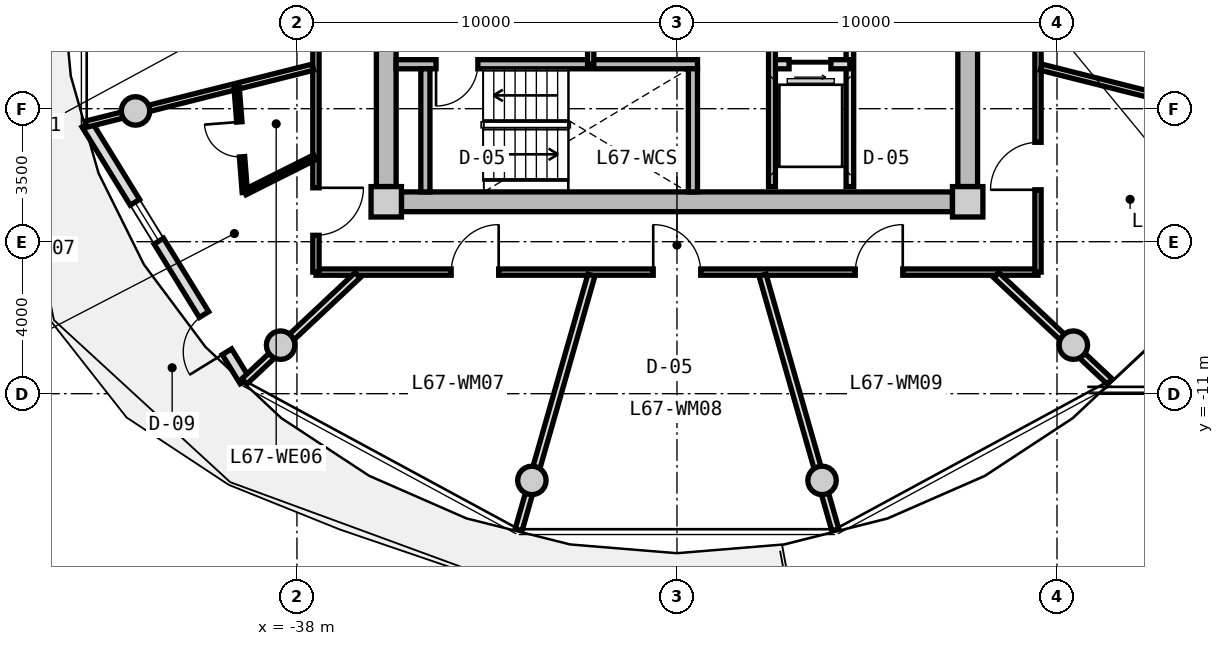
"""IFC4 building model, lengths in metres.
Left out: names, types, materials, properties, quantities, classifications, styles, units other than length and angle.
Written with IfcOpenShell. Run it as: python <this file> out.ifc"""

import sys

from ifc_helpers import new_model, si_unit, direction, frame, frame_2d, origin, origin_2d, place, context, subcontext, project, spatial, rectangle, circle, extrude, source, transform, mapped, element, fill, save


model = new_model("IFC4")
c1 = context("Model", 3, precision=1e-05, world=origin(), true_north=direction((0.0, 1.0)))
c2 = subcontext(c1, "Body", "Model", "MODEL_VIEW")
j1 = project(units=[si_unit("LENGTHUNIT", "METRE"), si_unit("PLANEANGLEUNIT", "RADIAN")], contexts=[c1])
p1 = place(None, origin())
s1 = spatial("IfcSite", under=j1, at=p1, CompositionType="ELEMENT")
p2 = place(p1, origin())
s2 = spatial("IfcBuilding", under=s1, at=p2, CompositionType="ELEMENT")
p3 = place(p2, frame((0.0, 0.0, 216.95)))
s3 = spatial("IfcBuildingStorey", under=s2, at=p3, CompositionType="ELEMENT", Elevation=216.95)
m1 = source(origin(), c2, "Body", "SweptSolid", [
    extrude(rectangle(XDim=0.8, YDim=0.8, at=origin_2d()), origin(), (0.0, 0.0, 1.0), 3.05),
])
for number, where, z_axis, x_axis in (
    (1, (-35.65, -5.95, 0.0), (0.0, 0.0, 1.0), (1.0, 0.0, 0.0)),
    (2, (-20.35, -5.95, 0.0), (0.0, 0.0, 1.0), (1.0, 0.0, 0.0)),
):
    element("IfcColumn", number, at=place(p3, frame(where, z_axis=z_axis, x_axis=x_axis)), inside=s3, PredefinedType="COLUMN", context=c2, shape_type="MappedRepresentation", body=[
        mapped(m1, transform((0.0, 0.0, 0.0), x_axis=(1.0, 0.0, 0.0), y_axis=(0.0, 1.0, 0.0), z_axis=(0.0, 0.0, 1.0), scale=1.0)),
    ])
m2 = source(origin(), c2, "Body", "SweptSolid", [
    extrude(rectangle(XDim=14.5, YDim=0.52, at=frame_2d((7.25, 0.0))), origin(), (0.0, 0.0, 1.0), 2.76),
])
p4 = place(p3, frame((-20.75, -5.95, 0.0), z_axis=(0.0, 0.0, 1.0), x_axis=(-1.0, 0.0, 0.0)))
e3 = element("IfcWall", 3, at=p4, inside=s3, PredefinedType="SHEAR", context=c2, shape_type="MappedRepresentation", body=[
    mapped(m2, transform((0.0, 0.0, 0.0), x_axis=(1.0, 0.0, 0.0), y_axis=(0.0, 1.0, 0.0), z_axis=(0.0, 0.0, 1.0), scale=1.0)),
])
m3 = source(origin(), c2, "Body", "SweptSolid", [
    extrude(rectangle(XDim=11.1, YDim=0.52, at=frame_2d((5.55, 0.0))), origin(), (0.0, 0.0, 1.0), 2.76),
])
p5 = place(p3, frame((-35.65, -5.55, 0.0), z_axis=(0.0, 0.0, 1.0), x_axis=(0.0, 1.0, 0.0)))
e4 = element("IfcWall", 4, at=p5, inside=s3, PredefinedType="SHEAR", context=c2, shape_type="MappedRepresentation", body=[
    mapped(m3, transform((0.0, 0.0, 0.0), x_axis=(1.0, 0.0, 0.0), y_axis=(0.0, 1.0, 0.0), z_axis=(0.0, 0.0, 1.0), scale=1.0)),
])
p6 = place(p5, frame((3.8, 0.0, 0.0)))
e5 = element("IfcOpeningElement", 5, at=p6, cuts=e4, PredefinedType="OPENING", context=c2, shape_type="SweptSolid", body=[
    extrude(rectangle(XDim=1.2, YDim=2.15, at=frame_2d((0.6, 1.075))), frame((0.0, 0.27, 0.0), z_axis=(0.0, -1.0, 0.0), x_axis=(1.0, 0.0, 0.0)), (0.0, 0.0, 1.0), 0.54),
])
p7 = place(p3, frame((-20.35, 5.55, 0.0), z_axis=(0.0, 0.0, 1.0), x_axis=(0.0, -1.0, 0.0)))
e6 = element("IfcWall", 6, at=p7, inside=s3, PredefinedType="SHEAR", context=c2, shape_type="MappedRepresentation", body=[
    mapped(m3, transform((0.0, 0.0, 0.0), x_axis=(1.0, 0.0, 0.0), y_axis=(0.0, 1.0, 0.0), z_axis=(0.0, 0.0, 1.0), scale=1.0)),
])
p8 = place(p7, frame((5.65, 0.0, 0.0)))
e7 = element("IfcOpeningElement", 7, at=p8, cuts=e6, PredefinedType="OPENING", context=c2, shape_type="SweptSolid", body=[
    extrude(rectangle(XDim=1.2, YDim=2.15, at=frame_2d((0.6, 1.075))), frame((0.0, 0.27, 0.0), z_axis=(0.0, -1.0, 0.0), x_axis=(1.0, 0.0, 0.0)), (0.0, 0.0, 1.0), 0.54),
])
m4 = source(origin(), c2, "Body", "SweptSolid", [
    extrude(circle(Radius=0.375, at=origin_2d()), origin(), (0.0, 0.0, 1.0), 3.05),
])
for number, where, z_axis, x_axis in (
    (8, (-42.247, -3.559, 0.0), (0.0, 0.0, 1.0), (1.0, 0.0, 0.0)),
    (9, (-38.43, -9.723, 0.0), (0.0, 0.0, 1.0), (1.0, 0.0, 0.0)),
    (10, (-31.818, -13.281, 0.0), (0.0, 0.0, 1.0), (1.0, 0.0, 0.0)),
    (11, (-24.182, -13.281, 0.0), (0.0, 0.0, 1.0), (1.0, 0.0, 0.0)),
    (12, (-17.57, -9.723, 0.0), (0.0, 0.0, 1.0), (1.0, 0.0, 0.0)),
):
    element("IfcColumn", number, at=place(p3, frame(where, z_axis=z_axis, x_axis=x_axis)), inside=s3, PredefinedType="COLUMN", context=c2, shape_type="MappedRepresentation", body=[
        mapped(m4, transform((0.0, 0.0, 0.0), x_axis=(1.0, 0.0, 0.0), y_axis=(0.0, 1.0, 0.0), z_axis=(0.0, 0.0, 1.0), scale=1.0)),
    ])
m5 = source(origin(), c2, "Body", "SweptSolid", [
    extrude(rectangle(XDim=7.938, YDim=0.29, at=frame_2d((3.969, 0.0))), origin(), (0.0, 0.0, 1.0), 2.76),
])
p9 = place(p3, frame((-39.37, -10.663, 0.0), z_axis=(0.0, 0.0, 1.0), x_axis=(-0.524244987663, 0.851567491694, 0.0)))
e13 = element("IfcWall", 13, at=p9, inside=s3, PredefinedType="SOLIDWALL", context=c2, shape_type="MappedRepresentation", body=[
    mapped(m5, transform((0.0, 0.0, 0.0), x_axis=(1.0, 0.0, 0.0), y_axis=(0.0, 1.0, 0.0), z_axis=(0.0, 0.0, 1.0), scale=1.0)),
])
p10 = place(p9, frame((0.9, 0.0, 0.0)))
e14 = element("IfcOpeningElement", 14, at=p10, cuts=e13, PredefinedType="OPENING", context=c2, shape_type="SweptSolid", body=[
    extrude(rectangle(XDim=1.15, YDim=2.25, at=frame_2d((0.575, 1.125))), frame((0.0, 0.155, 0.0), z_axis=(0.0, -1.0, 0.0), x_axis=(1.0, 0.0, 0.0)), (0.0, 0.0, 1.0), 0.31),
])
p11 = place(p9, frame((4.319, 0.0, 0.85)))
e15 = element("IfcOpeningElement", 15, at=p11, cuts=e13, PredefinedType="OPENING", context=c2, shape_type="SweptSolid", body=[
    extrude(rectangle(XDim=1.2, YDim=1.5, at=frame_2d((0.6, 0.75))), frame((0.0, 0.155, 0.0), z_axis=(0.0, -1.0, 0.0), x_axis=(1.0, 0.0, 0.0)), (0.0, 0.0, 1.0), 0.31),
])
m6 = source(origin(), c2, "Body", "SweptSolid", [
    extrude(rectangle(XDim=7.93, YDim=0.24, at=frame_2d((3.965, 0.0))), origin(), (0.0, 0.0, 1.0), 2.76),
])
p12 = place(p3, frame((-35.39, -2.33, 0.0), z_axis=(0.0, 0.0, 1.0), x_axis=(1.0, 0.0, 0.0)))
e16 = element("IfcWall", 16, at=p12, inside=s3, PredefinedType="PARTITIONING", context=c2, shape_type="MappedRepresentation", body=[
    mapped(m6, transform((0.0, 0.0, 0.0), x_axis=(1.0, 0.0, 0.0), y_axis=(0.0, 1.0, 0.0), z_axis=(0.0, 0.0, 1.0), scale=1.0)),
])
p13 = place(p12, frame((1.05, 0.0, 0.0)))
e17 = element("IfcOpeningElement", 17, at=p13, cuts=e16, PredefinedType="OPENING", context=c2, shape_type="SweptSolid", body=[
    extrude(rectangle(XDim=1.1, YDim=2.15, at=frame_2d((0.55, 1.075))), frame((0.0, 0.13, 0.0), z_axis=(0.0, -1.0, 0.0), x_axis=(1.0, 0.0, 0.0)), (0.0, 0.0, 1.0), 0.26),
])
m7 = source(origin(), c2, "Body", "SweptSolid", [
    extrude(rectangle(XDim=3.24, YDim=0.24, at=frame_2d((1.62, 0.0))), origin(), (0.0, 0.0, 1.0), 2.76),
])
for number, where, z_axis, x_axis in (
    (18, (-34.62, -5.69, 0.0), (0.0, 0.0, 1.0), (0.0, 1.0, 0.0)),
    (19, (-27.58, -5.69, 0.0), (0.0, 0.0, 1.0), (0.0, 1.0, 0.0)),
):
    element("IfcWall", number, at=place(p3, frame(where, z_axis=z_axis, x_axis=x_axis)), inside=s3, PredefinedType="PARTITIONING", context=c2, shape_type="MappedRepresentation", body=[
        mapped(m7, transform((0.0, 0.0, 0.0), x_axis=(1.0, 0.0, 0.0), y_axis=(0.0, 1.0, 0.0), z_axis=(0.0, 0.0, 1.0), scale=1.0)),
    ])
m8 = source(origin(), c2, "Body", "SweptSolid", [
    extrude(rectangle(XDim=3.8, YDim=0.2, at=frame_2d((1.9, 0.0))), origin(), (0.0, 0.0, 1.0), 2.745),
])
p14 = place(p3, frame((-23.45, -5.55, 0.0), z_axis=(0.0, 0.0, 1.0), x_axis=(0.0, 1.0, 0.0)))
e20 = element("IfcWall", 20, at=p14, inside=s3, PredefinedType="PARTITIONING", context=c2, shape_type="MappedRepresentation", body=[
    mapped(m8, transform((0.0, 0.0, 0.0), x_axis=(1.0, 0.0, 0.0), y_axis=(0.0, 1.0, 0.0), z_axis=(0.0, 0.0, 1.0), scale=1.0)),
])
m9 = source(origin(), c2, "Body", "SweptSolid", [
    extrude(rectangle(XDim=2.05, YDim=0.24, at=frame_2d((1.025, 0.0))), origin(), (0.0, 0.0, 1.0), 2.745),
])
p15 = place(p3, frame((-25.5, -2.33, 0.0), z_axis=(0.0, 0.0, 1.0), x_axis=(1.0, 0.0, 0.0)))
e21 = element("IfcWall", 21, at=p15, inside=s3, PredefinedType="PARTITIONING", context=c2, shape_type="MappedRepresentation", body=[
    mapped(m9, transform((0.0, 0.0, 0.0), x_axis=(1.0, 0.0, 0.0), y_axis=(0.0, 1.0, 0.0), z_axis=(0.0, 0.0, 1.0), scale=1.0)),
])
p16 = place(p15, frame((0.45, 0.0, 0.0)))
e22 = element("IfcOpeningElement", 22, at=p16, cuts=e21, PredefinedType="OPENING", context=c2, shape_type="SweptSolid", body=[
    extrude(rectangle(XDim=1.1, YDim=2.2, at=frame_2d((0.55, 1.1))), frame((0.0, 0.13, 0.0), z_axis=(0.0, -1.0, 0.0), x_axis=(1.0, 0.0, 0.0)), (0.0, 0.0, 1.0), 0.26),
])
m10 = source(origin(), c2, "Body", "SweptSolid", [
    extrude(rectangle(XDim=4.2, YDim=0.18, at=frame_2d((2.1, 0.0))), origin(), (0.0, 0.0, 1.0), 2.745),
])
p17 = place(p3, frame((-25.5, -5.55, 0.0), z_axis=(0.0, 0.0, 1.0), x_axis=(0.0, 1.0, 0.0)))
e23 = element("IfcWall", 23, at=p17, inside=s3, PredefinedType="PARTITIONING", context=c2, shape_type="MappedRepresentation", body=[
    mapped(m10, transform((0.0, 0.0, 0.0), x_axis=(1.0, 0.0, 0.0), y_axis=(0.0, 1.0, 0.0), z_axis=(0.0, 0.0, 1.0), scale=1.0)),
])
m11 = source(origin(), c2, "Body", "SweptSolid", [
    extrude(rectangle(XDim=0.98, YDim=0.165, at=frame_2d((0.49, 0.0))), origin(), (0.0, 0.0, 1.0), 2.745),
])
p18 = place(p3, frame((-30.27, -2.33, 0.0), z_axis=(0.0, 0.0, 1.0), x_axis=(0.0, 1.0, 0.0)))
e24 = element("IfcWall", 24, at=p18, inside=s3, PredefinedType="PARTITIONING", context=c2, shape_type="MappedRepresentation", body=[
    mapped(m11, transform((0.0, 0.0, 0.0), x_axis=(1.0, 0.0, 0.0), y_axis=(0.0, 1.0, 0.0), z_axis=(0.0, 0.0, 1.0), scale=1.0)),
])
m12 = source(origin(), c2, "Body", "SweptSolid", [
    extrude(rectangle(XDim=19.0, YDim=0.165, at=frame_2d((9.5, 0.0))), origin(), (0.0, 0.0, 1.0), 2.745),
])
p19 = place(p3, frame((-18.5, -7.8, 0.0), z_axis=(0.0, 0.0, 1.0), x_axis=(-1.0, 0.0, 0.0)))
e25 = element("IfcWall", 25, at=p19, inside=s3, PredefinedType="PARTITIONING", context=c2, shape_type="MappedRepresentation", body=[
    mapped(m12, transform((0.0, 0.0, 0.0), x_axis=(1.0, 0.0, 0.0), y_axis=(0.0, 1.0, 0.0), z_axis=(0.0, 0.0, 1.0), scale=1.0)),
])
p20 = place(p19, frame((14.191, 0.0, 0.0)))
e26 = element("IfcOpeningElement", 26, at=p20, cuts=e25, PredefinedType="OPENING", context=c2, shape_type="SweptSolid", body=[
    extrude(rectangle(XDim=1.25, YDim=2.2, at=frame_2d((0.625, 1.1))), frame((0.0, 0.093, 0.0), z_axis=(0.0, -1.0, 0.0), x_axis=(1.0, 0.0, 0.0)), (0.0, 0.0, 1.0), 0.185),
])
p21 = place(p19, frame((8.875, 0.0, 0.0)))
e27 = element("IfcOpeningElement", 27, at=p21, cuts=e25, PredefinedType="OPENING", context=c2, shape_type="SweptSolid", body=[
    extrude(rectangle(XDim=1.25, YDim=2.2, at=frame_2d((0.625, 1.1))), frame((0.0, 0.093, 0.0), z_axis=(0.0, -1.0, 0.0), x_axis=(1.0, 0.0, 0.0)), (0.0, 0.0, 1.0), 0.185),
])
p22 = place(p19, frame((3.559, 0.0, 0.0)))
e28 = element("IfcOpeningElement", 28, at=p22, cuts=e25, PredefinedType="OPENING", context=c2, shape_type="SweptSolid", body=[
    extrude(rectangle(XDim=1.25, YDim=2.2, at=frame_2d((0.625, 1.1))), frame((0.0, 0.093, 0.0), z_axis=(0.0, -1.0, 0.0), x_axis=(1.0, 0.0, 0.0)), (0.0, 0.0, 1.0), 0.185),
])
m13 = source(origin(), c2, "Body", "SweptSolid", [
    extrude(rectangle(XDim=6.88, YDim=0.165, at=frame_2d((3.44, 0.0))), origin(), (0.0, 0.0, 1.0), 2.745),
])
p23 = place(p3, frame((-37.5, -7.8, 0.0), z_axis=(0.0, 0.0, 1.0), x_axis=(0.0, 1.0, 0.0)))
e29 = element("IfcWall", 29, at=p23, inside=s3, PredefinedType="PARTITIONING", context=c2, shape_type="MappedRepresentation", body=[
    mapped(m13, transform((0.0, 0.0, 0.0), x_axis=(1.0, 0.0, 0.0), y_axis=(0.0, 1.0, 0.0), z_axis=(0.0, 0.0, 1.0), scale=1.0)),
])
p24 = place(p23, frame((0.968, 0.0, 0.0)))
e30 = element("IfcOpeningElement", 30, at=p24, cuts=e29, PredefinedType="OPENING", context=c2, shape_type="SweptSolid", body=[
    extrude(rectangle(XDim=1.25, YDim=2.2, at=frame_2d((0.625, 1.1))), frame((0.0, 0.093, 0.0), z_axis=(0.0, -1.0, 0.0), x_axis=(1.0, 0.0, 0.0)), (0.0, 0.0, 1.0), 0.185),
])
p25 = place(p3, frame((-18.5, -0.92, 0.0), z_axis=(0.0, 0.0, 1.0), x_axis=(0.0, -1.0, 0.0)))
e31 = element("IfcWall", 31, at=p25, inside=s3, PredefinedType="PARTITIONING", context=c2, shape_type="MappedRepresentation", body=[
    mapped(m13, transform((0.0, 0.0, 0.0), x_axis=(1.0, 0.0, 0.0), y_axis=(0.0, 1.0, 0.0), z_axis=(0.0, 0.0, 1.0), scale=1.0)),
])
p26 = place(p25, frame((3.464, 0.0, 0.0)))
e32 = element("IfcOpeningElement", 32, at=p26, cuts=e31, PredefinedType="OPENING", context=c2, shape_type="SweptSolid", body=[
    extrude(rectangle(XDim=1.25, YDim=2.2, at=frame_2d((0.625, 1.1))), frame((0.0, 0.093, 0.0), z_axis=(0.0, -1.0, 0.0), x_axis=(1.0, 0.0, 0.0)), (0.0, 0.0, 1.0), 0.185),
])
m14 = source(origin(), c2, "Body", "SweptSolid", [
    extrude(rectangle(XDim=6.157, YDim=0.165, at=frame_2d((3.079, 0.0))), origin(), (0.0, 0.0, 1.0), 2.345),
])
for number, where, z_axis, x_axis in (
    (33, (-37.58, -2.407, 0.0), (0.0, 0.0, 1.0), (-0.97, -0.244, 0.0)),
    (34, (-18.42, -2.407, 0.0), (0.0, 0.0, 1.0), (0.97, -0.244, 0.0)),
):
    element("IfcWall", number, at=place(p3, frame(where, z_axis=z_axis, x_axis=x_axis)), inside=s3, PredefinedType="PARTITIONING", context=c2, shape_type="MappedRepresentation", body=[
        mapped(m14, transform((0.0, 0.0, 0.0), x_axis=(1.0, 0.0, 0.0), y_axis=(0.0, 1.0, 0.0), z_axis=(0.0, 0.0, 1.0), scale=1.0)),
    ])
m15 = source(origin(), c2, "Body", "SweptSolid", [
    extrude(rectangle(XDim=4.089, YDim=0.19, at=frame_2d((2.044, 0.0))), origin(), (0.0, 0.0, 1.0), 2.345),
])
p27 = place(p3, frame((-36.402, -7.88, 0.0), z_axis=(0.0, 0.0, 1.0), x_axis=(-0.729401273609, -0.684086092577, 0.0)))
e35 = element("IfcWall", 35, at=p27, inside=s3, PredefinedType="PARTITIONING", context=c2, shape_type="MappedRepresentation", body=[
    mapped(m15, transform((0.0, 0.0, 0.0), x_axis=(1.0, 0.0, 0.0), y_axis=(0.0, 1.0, 0.0), z_axis=(0.0, 0.0, 1.0), scale=1.0)),
])
m16 = source(origin(), c2, "Body", "SweptSolid", [
    extrude(rectangle(XDim=2.06, YDim=0.14, at=frame_2d((1.03, 0.0))), origin(), (0.0, 0.0, 1.0), 2.745),
])
p28 = place(p3, frame((-37.53, -4.778, 0.0), z_axis=(0.0, 0.0, 1.0), x_axis=(-0.893952568722, -0.448161583444, 0.0)))
e36 = element("IfcWall", 36, at=p28, inside=s3, PredefinedType="PARTITIONING", context=c2, shape_type="MappedRepresentation", body=[
    mapped(m16, transform((0.0, 0.0, 0.0), x_axis=(1.0, 0.0, 0.0), y_axis=(0.0, 1.0, 0.0), z_axis=(0.0, 0.0, 1.0), scale=1.0)),
])
m17 = source(origin(), c2, "Body", "SweptSolid", [
    extrude(rectangle(XDim=2.798, YDim=0.14, at=frame_2d((1.399, 0.0))), origin(), (0.0, 0.0, 1.0), 2.745),
])
p29 = place(p3, frame((-39.371, -5.701, 0.0), z_axis=(0.0, 0.0, 1.0), x_axis=(-0.077823984089, 0.996967114553, 0.0)))
e37 = element("IfcWall", 37, at=p29, inside=s3, PredefinedType="PARTITIONING", context=c2, shape_type="MappedRepresentation", body=[
    mapped(m17, transform((0.0, 0.0, 0.0), x_axis=(1.0, 0.0, 0.0), y_axis=(0.0, 1.0, 0.0), z_axis=(0.0, 0.0, 1.0), scale=1.0)),
])
p30 = place(p29, frame((0.939, 0.0, 0.0)))
e38 = element("IfcOpeningElement", 38, at=p30, cuts=e37, PredefinedType="OPENING", context=c2, shape_type="SweptSolid", body=[
    extrude(rectangle(XDim=0.92, YDim=2.1, at=frame_2d((0.46, 1.05))), frame((0.0, 0.08, 0.0), z_axis=(0.0, -1.0, 0.0), x_axis=(1.0, 0.0, 0.0)), (0.0, 0.0, 1.0), 0.16),
])
m18 = source(origin(), c2, "Body", "SweptSolid", [
    extrude(rectangle(XDim=6.974, YDim=0.19, at=frame_2d((3.487, 0.0))), origin(), (0.0, 0.0, 1.0), 2.345),
])
for number, where, z_axis, x_axis in (
    (39, (-30.251, -7.88, 0.0), (0.0, 0.0, 1.0), (-0.275, -0.962, 0.0)),
    (40, (-25.749, -7.88, 0.0), (0.0, 0.0, 1.0), (0.275, -0.962, 0.0)),
):
    element("IfcWall", number, at=place(p3, frame(where, z_axis=z_axis, x_axis=x_axis)), inside=s3, PredefinedType="PARTITIONING", context=c2, shape_type="MappedRepresentation", body=[
        mapped(m18, transform((0.0, 0.0, 0.0), x_axis=(1.0, 0.0, 0.0), y_axis=(0.0, 1.0, 0.0), z_axis=(0.0, 0.0, 1.0), scale=1.0)),
    ])
p31 = place(p3, frame((-19.598, -7.88, 0.0), z_axis=(0.0, 0.0, 1.0), x_axis=(0.729401273609, -0.684086092577, 0.0)))
e41 = element("IfcWall", 41, at=p31, inside=s3, PredefinedType="PARTITIONING", context=c2, shape_type="MappedRepresentation", body=[
    mapped(m15, transform((0.0, 0.0, 0.0), x_axis=(1.0, 0.0, 0.0), y_axis=(0.0, 1.0, 0.0), z_axis=(0.0, 0.0, 1.0), scale=1.0)),
])
m19 = source(origin(), c2, "Body", "SweptSolid", [
    extrude(rectangle(XDim=1.15, YDim=2.25, at=frame_2d((0.575, 1.125))), frame((0.0, 0.025, 0.0), z_axis=(0.0, -1.0, 0.0), x_axis=(1.0, 0.0, 0.0)), (0.0, 0.0, 1.0), 0.05),
])
p32 = place(p10, origin())
e42 = element("IfcDoor", 42, at=p32, inside=s3, OperationType="SINGLE_SWING_LEFT", PredefinedType="DOOR", context=c2, shape_type="MappedRepresentation", body=[
    mapped(m19, transform((0.0, 0.0, 0.0), x_axis=(1.0, 0.0, 0.0), y_axis=(0.0, 1.0, 0.0), z_axis=(0.0, 0.0, 1.0), scale=1.0)),
])
fill(e14, e42)
m20 = source(origin(), c2, "Body", "SweptSolid", [
    extrude(rectangle(XDim=1.2, YDim=1.5, at=frame_2d((0.6, 0.75))), frame((0.0, 0.03, 0.0), z_axis=(0.0, -1.0, 0.0), x_axis=(1.0, 0.0, 0.0)), (0.0, 0.0, 1.0), 0.06),
])
p33 = place(p11, origin())
e43 = element("IfcWindow", 43, at=p33, inside=s3, PartitioningType="SINGLE_PANEL", PredefinedType="WINDOW", context=c2, shape_type="MappedRepresentation", body=[
    mapped(m20, transform((0.0, 0.0, 0.0), x_axis=(1.0, 0.0, 0.0), y_axis=(0.0, 1.0, 0.0), z_axis=(0.0, 0.0, 1.0), scale=1.0)),
])
fill(e15, e43)
m21 = source(origin(), c2, "Body", "SweptSolid", [
    extrude(rectangle(XDim=1.1, YDim=2.15, at=frame_2d((0.55, 1.075))), frame((0.0, 0.025, 0.0), z_axis=(0.0, -1.0, 0.0), x_axis=(1.0, 0.0, 0.0)), (0.0, 0.0, 1.0), 0.05),
])
p34 = place(p13, frame((1.1, 0.0, 0.0), z_axis=(0.0, 0.0, 1.0), x_axis=(-1.0, 0.0, 0.0)))
e44 = element("IfcDoor", 44, at=p34, inside=s3, OperationType="SINGLE_SWING_RIGHT", PredefinedType="DOOR", context=c2, shape_type="MappedRepresentation", body=[
    mapped(m21, transform((0.0, 0.0, 0.0), x_axis=(1.0, 0.0, 0.0), y_axis=(0.0, 1.0, 0.0), z_axis=(0.0, 0.0, 1.0), scale=1.0)),
])
fill(e17, e44)
m22 = source(origin(), c2, "Body", "SweptSolid", [
    extrude(rectangle(XDim=1.1, YDim=2.2, at=frame_2d((0.55, 1.1))), frame((0.0, 0.025, 0.0), z_axis=(0.0, -1.0, 0.0), x_axis=(1.0, 0.0, 0.0)), (0.0, 0.0, 1.0), 0.05),
])
p35 = place(p16, frame((1.1, 0.0, 0.0), z_axis=(0.0, 0.0, 1.0), x_axis=(-1.0, 0.0, 0.0)))
e45 = element("IfcDoor", 45, at=p35, inside=s3, OperationType="SLIDING_TO_RIGHT", PredefinedType="DOOR", context=c2, shape_type="MappedRepresentation", body=[
    mapped(m22, transform((0.0, 0.0, 0.0), x_axis=(1.0, 0.0, 0.0), y_axis=(0.0, 1.0, 0.0), z_axis=(0.0, 0.0, 1.0), scale=1.0)),
])
fill(e22, e45)
m23 = source(origin(), c2, "Body", "SweptSolid", [
    extrude(rectangle(XDim=1.25, YDim=2.2, at=frame_2d((0.625, 1.1))), frame((0.0, 0.025, 0.0), z_axis=(0.0, -1.0, 0.0), x_axis=(1.0, 0.0, 0.0)), (0.0, 0.0, 1.0), 0.05),
])
p36 = place(p24, frame((1.25, 0.0, 0.0), z_axis=(0.0, 0.0, 1.0), x_axis=(-1.0, 0.0, 0.0)))
e46 = element("IfcDoor", 46, at=p36, inside=s3, OperationType="SINGLE_SWING_LEFT", PredefinedType="DOOR", context=c2, shape_type="MappedRepresentation", body=[
    mapped(m23, transform((0.0, 0.0, 0.0), x_axis=(1.0, 0.0, 0.0), y_axis=(0.0, 1.0, 0.0), z_axis=(0.0, 0.0, 1.0), scale=1.0)),
])
fill(e30, e46)
m24 = source(origin(), c2, "Body", "SweptSolid", [
    extrude(rectangle(XDim=0.92, YDim=2.1, at=frame_2d((0.46, 1.05))), frame((0.0, 0.025, 0.0), z_axis=(0.0, -1.0, 0.0), x_axis=(1.0, 0.0, 0.0)), (0.0, 0.0, 1.0), 0.05),
])
p37 = place(p30, origin())
e47 = element("IfcDoor", 47, at=p37, inside=s3, OperationType="SINGLE_SWING_RIGHT", PredefinedType="DOOR", context=c2, shape_type="MappedRepresentation", body=[
    mapped(m24, transform((0.0, 0.0, 0.0), x_axis=(1.0, 0.0, 0.0), y_axis=(0.0, 1.0, 0.0), z_axis=(0.0, 0.0, 1.0), scale=1.0)),
])
fill(e38, e47)
p38 = place(p20, frame((1.25, 0.0, 0.0), z_axis=(0.0, 0.0, 1.0), x_axis=(-1.0, 0.0, 0.0)))
e48 = element("IfcDoor", 48, at=p38, inside=s3, OperationType="SINGLE_SWING_RIGHT", PredefinedType="DOOR", context=c2, shape_type="MappedRepresentation", body=[
    mapped(m23, transform((0.0, 0.0, 0.0), x_axis=(1.0, 0.0, 0.0), y_axis=(0.0, 1.0, 0.0), z_axis=(0.0, 0.0, 1.0), scale=1.0)),
])
fill(e26, e48)
p39 = place(p21, frame((1.25, 0.0, 0.0), z_axis=(0.0, 0.0, 1.0), x_axis=(-1.0, 0.0, 0.0)))
e49 = element("IfcDoor", 49, at=p39, inside=s3, OperationType="SINGLE_SWING_LEFT", PredefinedType="DOOR", context=c2, shape_type="MappedRepresentation", body=[
    mapped(m23, transform((0.0, 0.0, 0.0), x_axis=(1.0, 0.0, 0.0), y_axis=(0.0, 1.0, 0.0), z_axis=(0.0, 0.0, 1.0), scale=1.0)),
])
fill(e27, e49)
p40 = place(p22, frame((1.25, 0.0, 0.0), z_axis=(0.0, 0.0, 1.0), x_axis=(-1.0, 0.0, 0.0)))
e50 = element("IfcDoor", 50, at=p40, inside=s3, OperationType="SINGLE_SWING_RIGHT", PredefinedType="DOOR", context=c2, shape_type="MappedRepresentation", body=[
    mapped(m23, transform((0.0, 0.0, 0.0), x_axis=(1.0, 0.0, 0.0), y_axis=(0.0, 1.0, 0.0), z_axis=(0.0, 0.0, 1.0), scale=1.0)),
])
fill(e28, e50)
p41 = place(p26, frame((1.25, 0.0, 0.0), z_axis=(0.0, 0.0, 1.0), x_axis=(-1.0, 0.0, 0.0)))
e51 = element("IfcDoor", 51, at=p41, inside=s3, OperationType="SINGLE_SWING_LEFT", PredefinedType="DOOR", context=c2, shape_type="MappedRepresentation", body=[
    mapped(m23, transform((0.0, 0.0, 0.0), x_axis=(1.0, 0.0, 0.0), y_axis=(0.0, 1.0, 0.0), z_axis=(0.0, 0.0, 1.0), scale=1.0)),
])
fill(e32, e51)
save(model, sys.argv[1])
